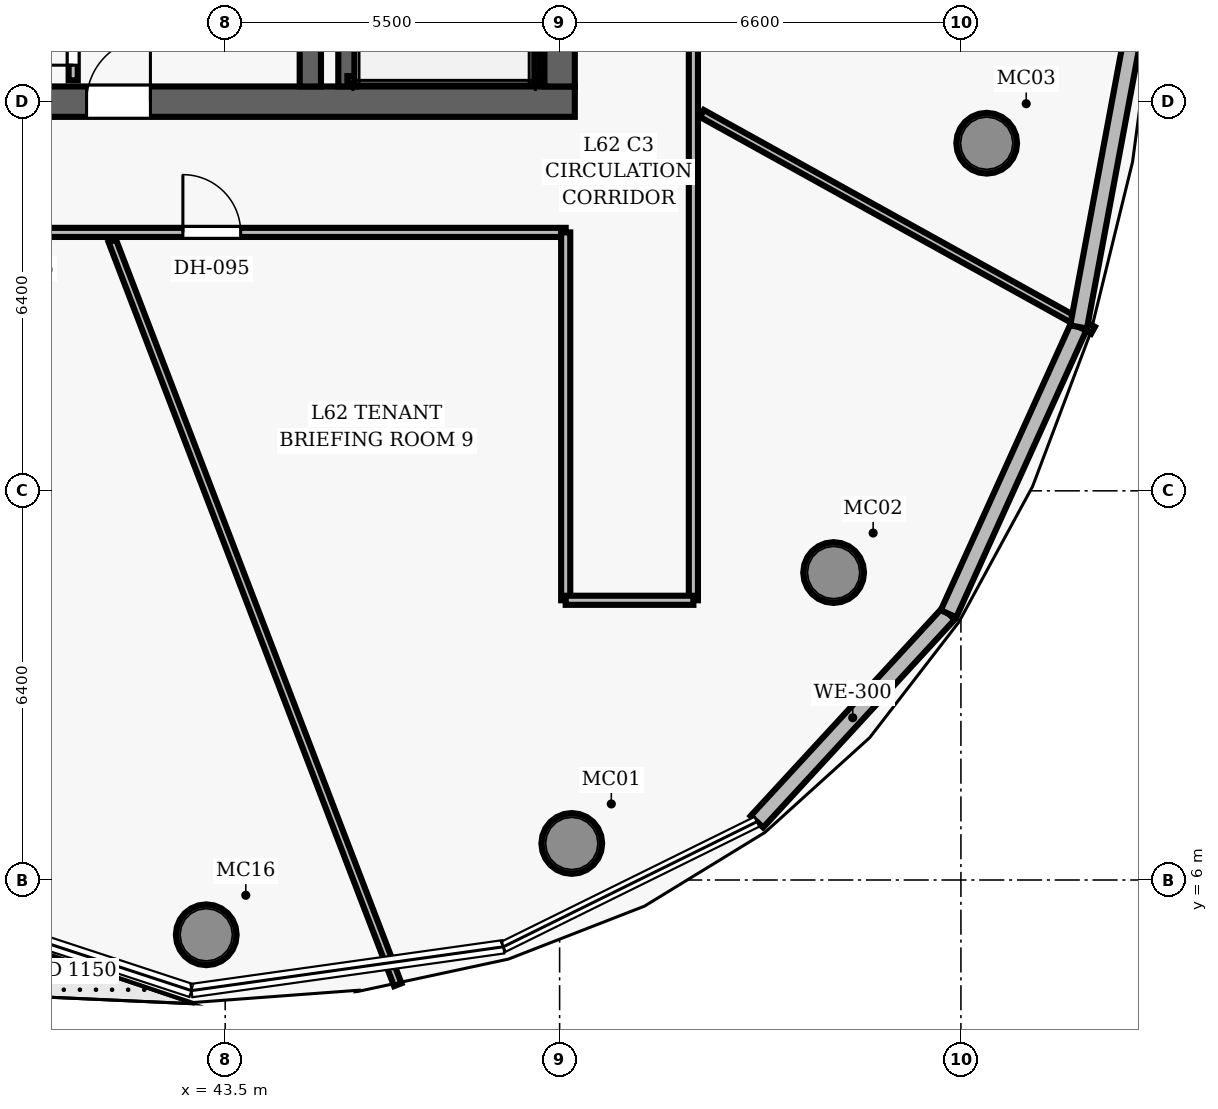
"""IFC4 building model, lengths in metres.
Left out: names, types, materials, properties, quantities, classifications, styles, units other than length and angle.
Written with IfcOpenShell. Run it as: python <this file> out.ifc"""

import sys

from ifc_helpers import new_model, si_unit, direction, frame, frame_2d, origin, origin_2d, place, context, subcontext, project, spatial, rectangle, hollow_circle, extrude, element, fill, save


model = new_model("IFC4")
c1 = context("Model", 3, precision=1e-05, world=origin(), true_north=direction((0.0, 1.0)))
c2 = subcontext(c1, "Body", "Model", "MODEL_VIEW")
j1 = project(units=[si_unit("LENGTHUNIT", "METRE"), si_unit("PLANEANGLEUNIT", "RADIAN")], contexts=[c1])
p1 = place(None, origin())
s1 = spatial("IfcSite", under=j1, at=p1, CompositionType="ELEMENT")
p2 = place(p1, origin())
s2 = spatial("IfcBuilding", under=s1, at=p2, CompositionType="ELEMENT")
p3 = place(p2, frame((0.0, 0.0, 245.9)))
s3 = spatial("IfcBuildingStorey", under=s2, at=p3, CompositionType="ELEMENT", Elevation=245.9)
p4 = place(p3, frame((26.75, 18.8, 0.0), z_axis=(0.0, 0.0, 1.0), x_axis=(1.0, 0.0, 0.0)))
e1 = element("IfcWall", 1, at=p4, inside=s3, PredefinedType="SHEAR", context=c2, shape_type="SweptSolid", body=[
    extrude(rectangle(XDim=22.5, YDim=0.5, at=frame_2d((11.25, 0.0))), origin(), (0.0, 0.0, 1.0), 3.85),
])
p5 = place(p4, frame((14.47, 0.0, 0.0)))
e2 = element("IfcOpeningElement", 2, at=p5, cuts=e1, PredefinedType="OPENING", context=c2, shape_type="SweptSolid", body=[
    extrude(rectangle(XDim=1.05, YDim=2.15, at=frame_2d((0.525, 1.075))), frame((0.0, 0.26, 0.0), z_axis=(0.0, -1.0, 0.0), x_axis=(1.0, 0.0, 0.0)), (0.0, 0.0, 1.0), 0.52),
])
p6 = place(p3, frame((49.0, 19.05, 0.0), z_axis=(0.0, 0.0, 1.0), x_axis=(0.0, 1.0, 0.0)))
e3 = element("IfcWall", 3, at=p6, inside=s3, PredefinedType="SHEAR", context=c2, shape_type="SweptSolid", body=[
    extrude(rectangle(XDim=13.9, YDim=0.5, at=frame_2d((6.95, 0.0))), origin(), (0.0, 0.0, 1.0), 3.85),
])
p7 = place(p6, frame((8.2, 0.0, 0.0)))
e4 = element("IfcOpeningElement", 4, at=p7, cuts=e3, PredefinedType="OPENING", context=c2, shape_type="SweptSolid", body=[
    extrude(rectangle(XDim=1.05, YDim=2.15, at=frame_2d((0.525, 1.075))), frame((0.0, 0.26, 0.0), z_axis=(0.0, -1.0, 0.0), x_axis=(1.0, 0.0, 0.0)), (0.0, 0.0, 1.0), 0.52),
])
p8 = place(p3, frame((44.9, 19.05, 0.0), z_axis=(0.0, 0.0, 1.0), x_axis=(0.0, 1.0, 0.0)))
e5 = element("IfcWall", 5, at=p8, inside=s3, PredefinedType="SHEAR", context=c2, shape_type="SweptSolid", body=[
    extrude(rectangle(XDim=13.9, YDim=0.35, at=frame_2d((6.95, 0.0))), origin(), (0.0, 0.0, 1.0), 3.85),
])
for number, where, z_axis, x_axis in (
    (6, (49.2, 6.601, 0.0), (0.0, 0.0, 1.0), (1.0, 0.0, 0.0)),
    (7, (53.506, 11.056, 0.0), (0.0, 0.0, 1.0), (1.0, 0.0, 0.0)),
    (8, (56.024, 18.116, 0.0), (0.0, 0.0, 1.0), (1.0, 0.0, 0.0)),
    (9, (43.188, 5.099, 0.0), (0.0, 0.0, 1.0), (1.0, 0.0, 0.0)),
):
    element("IfcColumn", number, at=place(p3, frame(where, z_axis=z_axis, x_axis=x_axis)), inside=s3, PredefinedType="COLUMN", context=c2, shape_type="SweptSolid", body=[
        extrude(hollow_circle(Radius=0.5, WallThickness=0.045, at=origin_2d()), origin(), (0.0, 0.0, 1.0), 3.85),
    ])
p9 = place(p3, frame((45.51, 19.05, 0.0), z_axis=(0.0, 0.0, 1.0), x_axis=(0.0, 1.0, 0.0)))
e10 = element("IfcWall", 10, at=p9, inside=s3, PredefinedType="SHEAR", context=c2, shape_type="SweptSolid", body=[
    extrude(rectangle(XDim=7.5, YDim=0.3, at=frame_2d((3.75, 0.0))), origin(), (0.0, 0.0, 1.0), 3.85),
])
p10 = place(p3, frame((48.605, 19.1, 0.0), z_axis=(0.0, 0.0, 1.0), x_axis=(0.0, 1.0, 0.0)))
e11 = element("IfcWall", 11, at=p10, inside=s3, PredefinedType="SHEAR", context=c2, shape_type="SweptSolid", body=[
    extrude(rectangle(XDim=7.45, YDim=0.12, at=frame_2d((3.725, 0.0))), origin(), (0.0, 0.0, 1.0), 3.85),
])
p11 = place(p3, frame((45.51, 19.16, 0.0), z_axis=(0.0, 0.0, 1.0), x_axis=(1.0, 0.0, 0.0)))
e12 = element("IfcWall", 12, at=p11, inside=s3, PredefinedType="SHEAR", context=c2, shape_type="SweptSolid", body=[
    extrude(rectangle(XDim=3.095, YDim=0.12, at=frame_2d((1.547, 0.0))), origin(), (0.0, 0.0, 1.0), 3.85),
])
p12 = place(p3, frame((41.0, 19.15, 0.0), z_axis=(0.0, 0.0, 1.0), x_axis=(0.0, 1.0, 0.0)))
e13 = element("IfcWall", 13, at=p12, inside=s3, PredefinedType="PARTITIONING", context=c2, shape_type="SweptSolid", body=[
    extrude(rectangle(XDim=7.95, YDim=0.15, at=frame_2d((3.975, 0.0))), origin(), (0.0, 0.0, 1.0), 3.04),
])
p13 = place(p12, frame((0.25, 0.0, 0.0)))
e14 = element("IfcOpeningElement", 14, at=p13, cuts=e13, PredefinedType="OPENING", context=c2, shape_type="SweptSolid", body=[
    extrude(rectangle(XDim=0.85, YDim=2.1, at=frame_2d((0.425, 1.05))), frame((0.0, 0.085, 0.0), z_axis=(0.0, -1.0, 0.0), x_axis=(1.0, 0.0, 0.0)), (0.0, 0.0, 1.0), 0.17),
])
p14 = place(p12, frame((2.953, 0.0, 0.0)))
e15 = element("IfcOpeningElement", 15, at=p14, cuts=e13, PredefinedType="OPENING", context=c2, shape_type="SweptSolid", body=[
    extrude(rectangle(XDim=0.85, YDim=2.1, at=frame_2d((0.425, 1.05))), frame((0.0, 0.085, 0.0), z_axis=(0.0, -1.0, 0.0), x_axis=(1.0, 0.0, 0.0)), (0.0, 0.0, 1.0), 0.17),
])
p15 = place(p12, frame((5.576, 0.0, 0.0)))
e16 = element("IfcOpeningElement", 16, at=p15, cuts=e13, PredefinedType="OPENING", context=c2, shape_type="SweptSolid", body=[
    extrude(rectangle(XDim=0.85, YDim=2.1, at=frame_2d((0.425, 1.05))), frame((0.0, 0.085, 0.0), z_axis=(0.0, -1.0, 0.0), x_axis=(1.0, 0.0, 0.0)), (0.0, 0.0, 1.0), 0.17),
])
p16 = place(p3, frame((26.9, 16.65, 0.0), z_axis=(0.0, 0.0, 1.0), x_axis=(1.0, 0.0, 0.0)))
e17 = element("IfcWall", 17, at=p16, inside=s3, PredefinedType="PARTITIONING", context=c2, shape_type="SweptSolid", body=[
    extrude(rectangle(XDim=22.2, YDim=0.15, at=frame_2d((11.1, 0.0))), origin(), (0.0, 0.0, 1.0), 3.04),
])
p17 = place(p16, frame((5.627, 0.0, 0.0)))
e18 = element("IfcOpeningElement", 18, at=p17, cuts=e17, PredefinedType="OPENING", context=c2, shape_type="SweptSolid", body=[
    extrude(rectangle(XDim=0.95, YDim=2.15, at=frame_2d((0.475, 1.075))), frame((0.0, 0.085, 0.0), z_axis=(0.0, -1.0, 0.0), x_axis=(1.0, 0.0, 0.0)), (0.0, 0.0, 1.0), 0.17),
])
p18 = place(p16, frame((12.684, 0.0, 0.0)))
e19 = element("IfcOpeningElement", 19, at=p18, cuts=e17, PredefinedType="OPENING", context=c2, shape_type="SweptSolid", body=[
    extrude(rectangle(XDim=0.95, YDim=2.15, at=frame_2d((0.475, 1.075))), frame((0.0, 0.085, 0.0), z_axis=(0.0, -1.0, 0.0), x_axis=(1.0, 0.0, 0.0)), (0.0, 0.0, 1.0), 0.17),
])
p19 = place(p16, frame((15.904, 0.0, 0.0)))
e20 = element("IfcOpeningElement", 20, at=p19, cuts=e17, PredefinedType="OPENING", context=c2, shape_type="SweptSolid", body=[
    extrude(rectangle(XDim=0.95, YDim=2.15, at=frame_2d((0.475, 1.075))), frame((0.0, 0.085, 0.0), z_axis=(0.0, -1.0, 0.0), x_axis=(1.0, 0.0, 0.0)), (0.0, 0.0, 1.0), 0.17),
])
p20 = place(p3, frame((51.2, 10.6, 0.0), z_axis=(0.0, 0.0, 1.0), x_axis=(0.0, 1.0, 0.0)))
e21 = element("IfcWall", 21, at=p20, inside=s3, PredefinedType="PARTITIONING", context=c2, shape_type="SweptSolid", body=[
    extrude(rectangle(XDim=30.8, YDim=0.15, at=frame_2d((15.4, 0.0))), origin(), (0.0, 0.0, 1.0), 3.04),
])
p21 = place(p20, frame((20.494, 0.0, 0.0)))
e22 = element("IfcOpeningElement", 22, at=p21, cuts=e21, PredefinedType="OPENING", context=c2, shape_type="SweptSolid", body=[
    extrude(rectangle(XDim=0.95, YDim=2.15, at=frame_2d((0.475, 1.075))), frame((0.0, 0.085, 0.0), z_axis=(0.0, -1.0, 0.0), x_axis=(1.0, 0.0, 0.0)), (0.0, 0.0, 1.0), 0.17),
])
p22 = place(p20, frame((10.941, 0.0, 0.0)))
e23 = element("IfcOpeningElement", 23, at=p22, cuts=e21, PredefinedType="OPENING", context=c2, shape_type="SweptSolid", body=[
    extrude(rectangle(XDim=0.95, YDim=2.15, at=frame_2d((0.475, 1.075))), frame((0.0, 0.085, 0.0), z_axis=(0.0, -1.0, 0.0), x_axis=(1.0, 0.0, 0.0)), (0.0, 0.0, 1.0), 0.17),
])
p23 = place(p3, frame((49.1, 10.6, 0.0), z_axis=(0.0, 0.0, 1.0), x_axis=(0.0, 1.0, 0.0)))
e24 = element("IfcWall", 24, at=p23, inside=s3, PredefinedType="PARTITIONING", context=c2, shape_type="SweptSolid", body=[
    extrude(rectangle(XDim=6.05, YDim=0.15, at=frame_2d((3.025, 0.0))), origin(), (0.0, 0.0, 1.0), 3.04),
])
p24 = place(p3, frame((49.1, 10.6, 0.0), z_axis=(0.0, 0.0, 1.0), x_axis=(1.0, 0.0, 0.0)))
e25 = element("IfcWall", 25, at=p24, inside=s3, PredefinedType="PARTITIONING", context=c2, shape_type="SweptSolid", body=[
    extrude(rectangle(XDim=2.1, YDim=0.15, at=frame_2d((1.05, 0.0))), origin(), (0.0, 0.0, 1.0), 3.04),
])
p25 = place(p3, frame((41.643, 16.51, 0.0), z_axis=(0.0, 0.0, 1.0), x_axis=(0.35837217609, -0.933578804068, 0.0)))
e26 = element("IfcWall", 26, at=p25, inside=s3, PredefinedType="PARTITIONING", context=c2, shape_type="SweptSolid", body=[
    extrude(rectangle(XDim=13.103, YDim=0.13, at=frame_2d((6.551, 0.0))), origin(), (0.0, 0.0, 1.0), 3.04),
])
p26 = place(p3, frame((51.34, 18.605, 0.0), z_axis=(0.0, 0.0, 1.0), x_axis=(0.874631338036, -0.48478863696, 0.0)))
e27 = element("IfcWall", 27, at=p26, inside=s3, PredefinedType="PARTITIONING", context=c2, shape_type="SweptSolid", body=[
    extrude(rectangle(XDim=7.354, YDim=0.13, at=frame_2d((3.677, 0.0))), origin(), (0.0, 0.0, 1.0), 3.04),
])
p27 = place(p3, frame((55.396, 10.379, 0.0), z_axis=(0.0, 0.0, 1.0), x_axis=(-0.677562449633, -0.735465245166, 0.0)))
e28 = element("IfcWall", 28, at=p27, inside=s3, PredefinedType="SOLIDWALL", context=c2, shape_type="SweptSolid", body=[
    extrude(rectangle(XDim=4.651, YDim=0.28, at=frame_2d((2.325, 0.0))), origin(), (0.0, 0.0, 1.0), 3.625),
])
p28 = place(p3, frame((57.535, 15.096, 0.0), z_axis=(0.0, 0.0, 1.0), x_axis=(-0.412989460756, -0.910735804339, 0.0)))
e29 = element("IfcWall", 29, at=p28, inside=s3, PredefinedType="SOLIDWALL", context=c2, shape_type="SweptSolid", body=[
    extrude(rectangle(XDim=5.179, YDim=0.28, at=frame_2d((2.59, 0.0))), origin(), (0.0, 0.0, 1.0), 3.625),
])
p29 = place(p3, frame((58.609, 20.857, 0.0), z_axis=(0.0, 0.0, 1.0), x_axis=(-0.183224424641, -0.983071111474, 0.0)))
e30 = element("IfcWall", 30, at=p29, inside=s3, PredefinedType="SOLIDWALL", context=c2, shape_type="SweptSolid", body=[
    extrude(rectangle(XDim=5.86, YDim=0.28, at=frame_2d((2.93, 0.0))), origin(), (0.0, 0.0, 1.0), 3.625),
])
p30 = place(p5, origin())
e31 = element("IfcDoor", 31, at=p30, inside=s3, OperationType="SINGLE_SWING_RIGHT", PredefinedType="DOOR", context=c2, shape_type="SweptSolid", body=[
    extrude(rectangle(XDim=1.05, YDim=2.15, at=frame_2d((0.525, 1.075))), frame((0.0, 0.025, 0.0), z_axis=(0.0, -1.0, 0.0), x_axis=(1.0, 0.0, 0.0)), (0.0, 0.0, 1.0), 0.05),
])
fill(e2, e31)
p31 = place(p13, origin())
e32 = element("IfcDoor", 32, at=p31, inside=s3, OperationType="SINGLE_SWING_LEFT", PredefinedType="DOOR", context=c2, shape_type="SweptSolid", body=[
    extrude(rectangle(XDim=0.85, YDim=2.1, at=frame_2d((0.425, 1.05))), frame((0.0, 0.025, 0.0), z_axis=(0.0, -1.0, 0.0), x_axis=(1.0, 0.0, 0.0)), (0.0, 0.0, 1.0), 0.05),
])
fill(e14, e32)
p32 = place(p19, origin())
e33 = element("IfcDoor", 33, at=p32, inside=s3, OperationType="SINGLE_SWING_LEFT", PredefinedType="DOOR", context=c2, shape_type="SweptSolid", body=[
    extrude(rectangle(XDim=0.95, YDim=2.15, at=frame_2d((0.475, 1.075))), frame((0.0, 0.025, 0.0), z_axis=(0.0, -1.0, 0.0), x_axis=(1.0, 0.0, 0.0)), (0.0, 0.0, 1.0), 0.05),
])
fill(e20, e33)
save(model, sys.argv[1])
